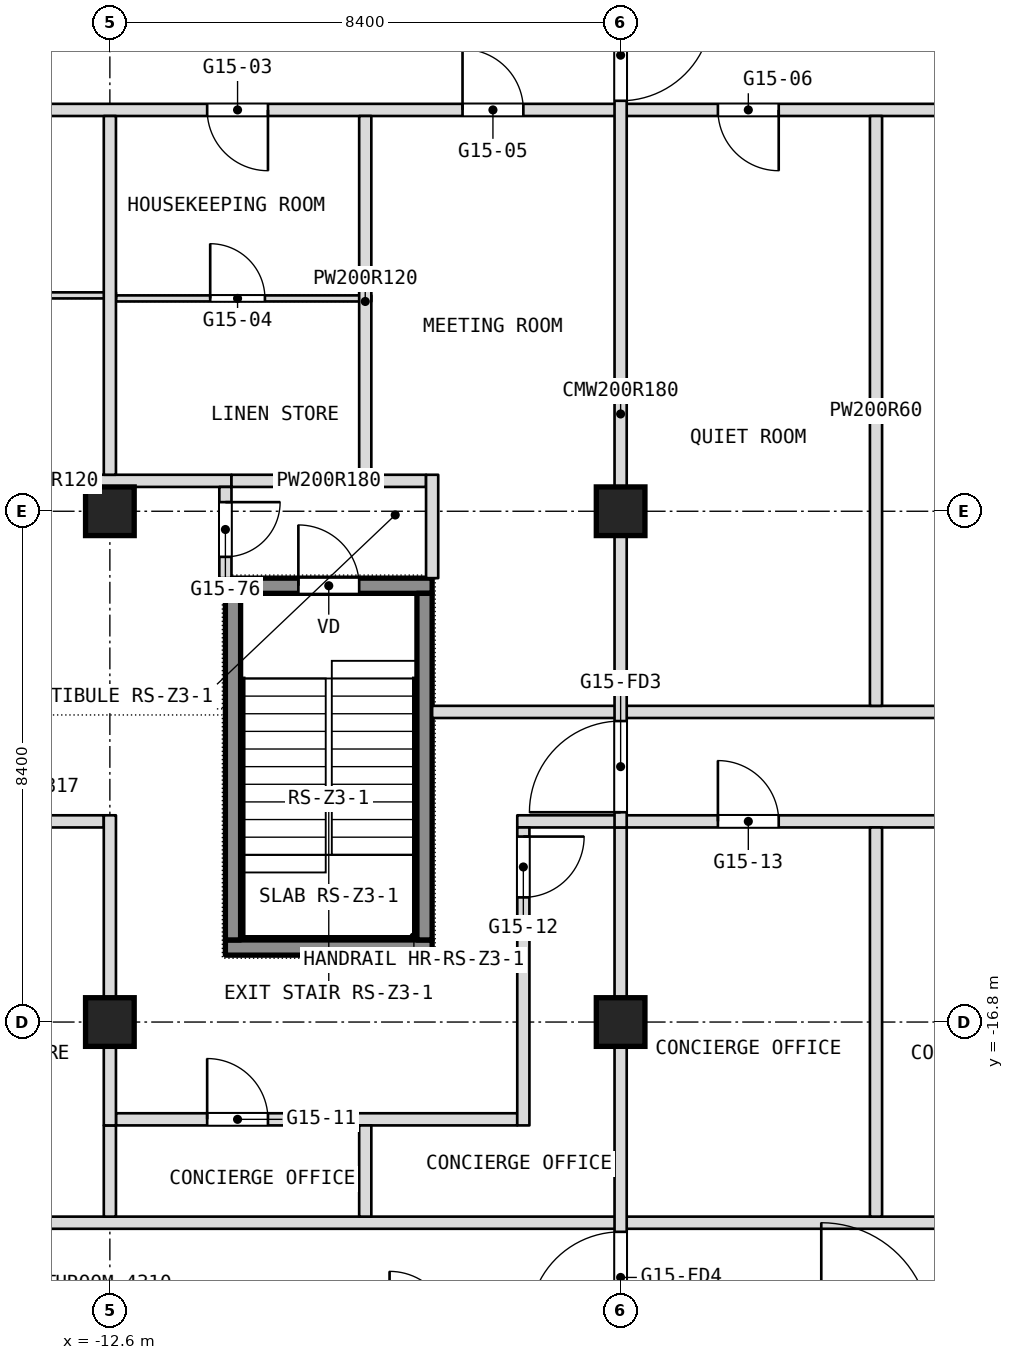
"""IFC4 building model, lengths in metres.
Left out: names, types, materials, properties, quantities, classifications, styles, units other than length and angle.
Written with IfcOpenShell. Run it as: python <this file> out.ifc"""

import sys

from ifc_helpers import new_model, si_unit, direction, frame, frame_2d, origin, origin_2d, place, context, subcontext, project, spatial, rectangle, extrude, element, fill, save


model = new_model("IFC4")
c1 = context("Model", 3, precision=1e-05, world=origin(), true_north=direction((0.0, 1.0)))
c2 = subcontext(c1, "Body", "Model", "MODEL_VIEW")
j1 = project(units=[si_unit("LENGTHUNIT", "METRE"), si_unit("PLANEANGLEUNIT", "RADIAN")], contexts=[c1])
p1 = place(None, origin())
s1 = spatial("IfcSite", under=j1, at=p1, CompositionType="ELEMENT")
p2 = place(p1, origin())
s2 = spatial("IfcBuilding", under=s1, at=p2, CompositionType="ELEMENT")
p3 = place(p2, frame((0.0, 0.0, 191.3)))
s3 = spatial("IfcBuildingStorey", under=s2, at=p3, CompositionType="ELEMENT", Elevation=191.3)
for number, where, z_axis, x_axis in (
    (1, (-12.6, -16.8, 0.0), (0.0, 0.0, 1.0), (1.0, 0.0, 0.0)),
    (2, (-12.6, -8.4, 0.0), (0.0, 0.0, 1.0), (1.0, 0.0, 0.0)),
    (3, (-4.2, -16.8, 0.0), (0.0, 0.0, 1.0), (1.0, 0.0, 0.0)),
    (4, (-4.2, -8.4, 0.0), (0.0, 0.0, 1.0), (1.0, 0.0, 0.0)),
):
    element("IfcColumn", number, at=place(p3, frame(where, z_axis=z_axis, x_axis=x_axis)), inside=s3, PredefinedType="COLUMN", context=c2, shape_type="SweptSolid", body=[
        extrude(rectangle(XDim=0.8, YDim=0.8, at=origin_2d()), origin(), (0.0, 0.0, 1.0), 3.6),
    ])
p4 = place(p3, frame((-16.7, -20.1, 0.0), z_axis=(0.0, 0.0, 1.0), x_axis=(1.0, 0.0, 0.0)))
e5 = element("IfcWall", 5, at=p4, inside=s3, PredefinedType="PARTITIONING", context=c2, shape_type="SweptSolid", body=[
    extrude(rectangle(XDim=33.4, YDim=0.2, at=frame_2d((16.7, 0.0))), origin(), (0.0, 0.0, 1.0), 3.34),
])
p5 = place(p3, frame((-12.5, -18.4, 0.0), z_axis=(0.0, 0.0, 1.0), x_axis=(1.0, 0.0, 0.0)))
e6 = element("IfcWall", 6, at=p5, inside=s3, PredefinedType="PARTITIONING", context=c2, shape_type="SweptSolid", body=[
    extrude(rectangle(XDim=6.6, YDim=0.2, at=frame_2d((3.3, 0.0))), origin(), (0.0, 0.0, 1.0), 3.34),
])
p6 = place(p5, frame((1.5, 0.0, 0.0)))
e7 = element("IfcOpeningElement", 7, at=p6, cuts=e6, PredefinedType="OPENING", context=c2, shape_type="SweptSolid", body=[
    extrude(rectangle(XDim=1.0, YDim=2.1, at=frame_2d((0.5, 1.05))), frame((0.0, 0.1, 0.0), z_axis=(0.0, -1.0, 0.0), x_axis=(1.0, 0.0, 0.0)), (0.0, 0.0, 1.0), 0.2),
])
p7 = place(p3, frame((-16.7, -13.5, 0.0), z_axis=(0.0, 0.0, 1.0), x_axis=(1.0, 0.0, 0.0)))
e8 = element("IfcWall", 8, at=p7, inside=s3, PredefinedType="PARTITIONING", context=c2, shape_type="SweptSolid", body=[
    extrude(rectangle(XDim=4.0, YDim=0.2, at=frame_2d((2.0, 0.0))), origin(), (0.0, 0.0, 1.0), 3.34),
])
p8 = place(p7, frame((1.5, 0.0, 0.0)))
e9 = element("IfcOpeningElement", 9, at=p8, cuts=e8, PredefinedType="OPENING", context=c2, shape_type="SweptSolid", body=[
    extrude(rectangle(XDim=1.0, YDim=2.1, at=frame_2d((0.5, 1.05))), frame((0.0, 0.1, 0.0), z_axis=(0.0, -1.0, 0.0), x_axis=(1.0, 0.0, 0.0)), (0.0, 0.0, 1.0), 0.2),
])
p9 = place(p3, frame((-5.9, -13.5, 0.0), z_axis=(0.0, 0.0, 1.0), x_axis=(1.0, 0.0, 0.0)))
e10 = element("IfcWall", 10, at=p9, inside=s3, PredefinedType="PARTITIONING", context=c2, shape_type="SweptSolid", body=[
    extrude(rectangle(XDim=11.6, YDim=0.2, at=frame_2d((5.8, 0.0))), origin(), (0.0, 0.0, 1.0), 3.34),
])
p10 = place(p9, frame((3.3, 0.0, 0.0)))
e11 = element("IfcOpeningElement", 11, at=p10, cuts=e10, PredefinedType="OPENING", context=c2, shape_type="SweptSolid", body=[
    extrude(rectangle(XDim=1.0, YDim=2.1, at=frame_2d((0.5, 1.05))), frame((0.0, 0.1, 0.0), z_axis=(0.0, -1.0, 0.0), x_axis=(1.0, 0.0, 0.0)), (0.0, 0.0, 1.0), 0.2),
])
p11 = place(p9, frame((7.5, 0.0, 0.0)))
e12 = element("IfcOpeningElement", 12, at=p11, cuts=e10, PredefinedType="OPENING", context=c2, shape_type="SweptSolid", body=[
    extrude(rectangle(XDim=1.0, YDim=2.1, at=frame_2d((0.5, 1.05))), frame((0.0, 0.1, 0.0), z_axis=(0.0, -1.0, 0.0), x_axis=(1.0, 0.0, 0.0)), (0.0, 0.0, 1.0), 0.2),
])
p12 = place(p9, frame((10.45, 0.0, 0.0)))
e13 = element("IfcOpeningElement", 13, at=p12, cuts=e10, PredefinedType="OPENING", context=c2, shape_type="SweptSolid", body=[
    extrude(rectangle(XDim=1.0, YDim=2.1, at=frame_2d((0.5, 1.05))), frame((0.0, 0.1, 0.0), z_axis=(0.0, -1.0, 0.0), x_axis=(1.0, 0.0, 0.0)), (0.0, 0.0, 1.0), 0.2),
])
p13 = place(p3, frame((-7.3, -11.7, 0.0), z_axis=(0.0, 0.0, 1.0), x_axis=(1.0, 0.0, 0.0)))
e14 = element("IfcWall", 14, at=p13, inside=s3, PredefinedType="PARTITIONING", context=c2, shape_type="SweptSolid", body=[
    extrude(rectangle(XDim=14.6, YDim=0.2, at=frame_2d((7.3, 0.0))), origin(), (0.0, 0.0, 1.0), 3.34),
])
p14 = place(p3, frame((-16.7, -7.9, 0.0), z_axis=(0.0, 0.0, 1.0), x_axis=(1.0, 0.0, 0.0)))
e15 = element("IfcWall", 15, at=p14, inside=s3, PredefinedType="PARTITIONING", context=c2, shape_type="SweptSolid", body=[
    extrude(rectangle(XDim=6.1, YDim=0.2, at=frame_2d((3.05, 0.0))), origin(), (0.0, 0.0, 1.0), 3.34),
])
p15 = place(p3, frame((-10.6, -7.9, 0.0), z_axis=(0.0, 0.0, 1.0), x_axis=(1.0, 0.0, 0.0)))
e16 = element("IfcWall", 16, at=p15, inside=s3, PredefinedType="PARTITIONING", context=c2, shape_type="SweptSolid", body=[
    extrude(rectangle(XDim=3.2, YDim=0.2, at=frame_2d((1.6, 0.0))), origin(), (0.0, 0.0, 1.0), 3.34),
])
p16 = place(p3, frame((-12.5, -4.9, 0.0), z_axis=(0.0, 0.0, 1.0), x_axis=(1.0, 0.0, 0.0)))
e17 = element("IfcWall", 17, at=p16, inside=s3, PredefinedType="PARTITIONING", context=c2, shape_type="SweptSolid", body=[
    extrude(rectangle(XDim=4.2, YDim=0.1, at=frame_2d((2.1, 0.0))), origin(), (0.0, 0.0, 1.0), 3.34),
])
p17 = place(p16, frame((1.55, 0.0, 0.0)))
e18 = element("IfcOpeningElement", 18, at=p17, cuts=e17, PredefinedType="OPENING", context=c2, shape_type="SweptSolid", body=[
    extrude(rectangle(XDim=0.9, YDim=2.1, at=frame_2d((0.45, 1.05))), frame((0.0, 0.05, 0.0), z_axis=(0.0, -1.0, 0.0), x_axis=(1.0, 0.0, 0.0)), (0.0, 0.0, 1.0), 0.1),
])
p18 = place(p3, frame((-16.7, -4.85, 0.0), z_axis=(0.0, 0.0, 1.0), x_axis=(1.0, 0.0, 0.0)))
e19 = element("IfcWall", 19, at=p18, inside=s3, PredefinedType="PARTITIONING", context=c2, shape_type="SweptSolid", body=[
    extrude(rectangle(XDim=4.2, YDim=0.1, at=frame_2d((2.1, 0.0))), origin(), (0.0, 0.0, 1.0), 3.34),
])
p19 = place(p18, frame((1.55, 0.0, 0.0)))
e20 = element("IfcOpeningElement", 20, at=p19, cuts=e19, PredefinedType="OPENING", context=c2, shape_type="SweptSolid", body=[
    extrude(rectangle(XDim=0.9, YDim=2.1, at=frame_2d((0.45, 1.05))), frame((0.0, 0.05, 0.0), z_axis=(0.0, -1.0, 0.0), x_axis=(1.0, 0.0, 0.0)), (0.0, 0.0, 1.0), 0.1),
])
p20 = place(p3, frame((-16.9, -1.8, 0.0), z_axis=(0.0, 0.0, 1.0), x_axis=(1.0, 0.0, 0.0)))
e21 = element("IfcWall", 21, at=p20, inside=s3, PredefinedType="PARTITIONING", context=c2, shape_type="SweptSolid", body=[
    extrude(rectangle(XDim=33.8, YDim=0.2, at=frame_2d((16.9, 0.0))), origin(), (0.0, 0.0, 1.0), 3.34),
])
p21 = place(p20, frame((1.7, 0.0, 0.0)))
e22 = element("IfcOpeningElement", 22, at=p21, cuts=e21, PredefinedType="OPENING", context=c2, shape_type="SweptSolid", body=[
    extrude(rectangle(XDim=1.0, YDim=2.1, at=frame_2d((0.5, 1.05))), frame((0.0, 0.1, 0.0), z_axis=(0.0, -1.0, 0.0), x_axis=(1.0, 0.0, 0.0)), (0.0, 0.0, 1.0), 0.2),
])
p22 = place(p20, frame((5.9, 0.0, 0.0)))
e23 = element("IfcOpeningElement", 23, at=p22, cuts=e21, PredefinedType="OPENING", context=c2, shape_type="SweptSolid", body=[
    extrude(rectangle(XDim=1.0, YDim=2.1, at=frame_2d((0.5, 1.05))), frame((0.0, 0.1, 0.0), z_axis=(0.0, -1.0, 0.0), x_axis=(1.0, 0.0, 0.0)), (0.0, 0.0, 1.0), 0.2),
])
p23 = place(p20, frame((10.1, 0.0, 0.0)))
e24 = element("IfcOpeningElement", 24, at=p23, cuts=e21, PredefinedType="OPENING", context=c2, shape_type="SweptSolid", body=[
    extrude(rectangle(XDim=1.0, YDim=2.1, at=frame_2d((0.5, 1.05))), frame((0.0, 0.1, 0.0), z_axis=(0.0, -1.0, 0.0), x_axis=(1.0, 0.0, 0.0)), (0.0, 0.0, 1.0), 0.2),
])
p24 = place(p20, frame((14.3, 0.0, 0.0)))
e25 = element("IfcOpeningElement", 25, at=p24, cuts=e21, PredefinedType="OPENING", context=c2, shape_type="SweptSolid", body=[
    extrude(rectangle(XDim=1.0, YDim=2.1, at=frame_2d((0.5, 1.05))), frame((0.0, 0.1, 0.0), z_axis=(0.0, -1.0, 0.0), x_axis=(1.0, 0.0, 0.0)), (0.0, 0.0, 1.0), 0.2),
])
p25 = place(p20, frame((18.5, 0.0, 0.0)))
e26 = element("IfcOpeningElement", 26, at=p25, cuts=e21, PredefinedType="OPENING", context=c2, shape_type="SweptSolid", body=[
    extrude(rectangle(XDim=1.0, YDim=2.1, at=frame_2d((0.5, 1.05))), frame((0.0, 0.1, 0.0), z_axis=(0.0, -1.0, 0.0), x_axis=(1.0, 0.0, 0.0)), (0.0, 0.0, 1.0), 0.2),
])
p26 = place(p20, frame((24.4, 0.0, 0.0)))
e27 = element("IfcOpeningElement", 27, at=p26, cuts=e21, PredefinedType="OPENING", context=c2, shape_type="SweptSolid", body=[
    extrude(rectangle(XDim=1.8, YDim=2.1, at=frame_2d((0.9, 1.05))), frame((0.0, 0.1, 0.0), z_axis=(0.0, -1.0, 0.0), x_axis=(1.0, 0.0, 0.0)), (0.0, 0.0, 1.0), 0.2),
])
p27 = place(p20, frame((31.1, 0.0, 0.0)))
e28 = element("IfcOpeningElement", 28, at=p27, cuts=e21, PredefinedType="OPENING", context=c2, shape_type="SweptSolid", body=[
    extrude(rectangle(XDim=1.0, YDim=2.1, at=frame_2d((0.5, 1.05))), frame((0.0, 0.1, 0.0), z_axis=(0.0, -1.0, 0.0), x_axis=(1.0, 0.0, 0.0)), (0.0, 0.0, 1.0), 0.2),
])
p28 = place(p3, frame((0.0, -20.0, 0.0), z_axis=(0.0, 0.0, 1.0), x_axis=(0.0, 1.0, 0.0)))
e29 = element("IfcWall", 29, at=p28, inside=s3, PredefinedType="PARTITIONING", context=c2, shape_type="SweptSolid", body=[
    extrude(rectangle(XDim=6.4, YDim=0.2, at=frame_2d((3.2, 0.0))), origin(), (0.0, 0.0, 1.0), 3.34),
])
p29 = place(p3, frame((0.0, -11.6, 0.0), z_axis=(0.0, 0.0, 1.0), x_axis=(0.0, 1.0, 0.0)))
e30 = element("IfcWall", 30, at=p29, inside=s3, PredefinedType="PARTITIONING", context=c2, shape_type="SweptSolid", body=[
    extrude(rectangle(XDim=9.7, YDim=0.2, at=frame_2d((4.85, 0.0))), origin(), (0.0, 0.0, 1.0), 3.34),
])
p30 = place(p3, frame((-4.2, -22.0, 0.0), z_axis=(0.0, 0.0, 1.0), x_axis=(0.0, 1.0, 0.0)))
e31 = element("IfcWall", 31, at=p30, inside=s3, PredefinedType="PARTITIONING", context=c2, shape_type="SweptSolid", body=[
    extrude(rectangle(XDim=8.4, YDim=0.2, at=frame_2d((4.2, 0.0))), origin(), (0.0, 0.0, 1.0), 3.34),
])
p31 = place(p30, frame((0.25, 0.0, 0.0)))
e32 = element("IfcOpeningElement", 32, at=p31, cuts=e31, PredefinedType="OPENING", context=c2, shape_type="SweptSolid", body=[
    extrude(rectangle(XDim=1.5, YDim=2.1, at=frame_2d((0.75, 1.05))), frame((0.0, 0.1, 0.0), z_axis=(0.0, -1.0, 0.0), x_axis=(1.0, 0.0, 0.0)), (0.0, 0.0, 1.0), 0.2),
])
p32 = place(p3, frame((-4.2, -13.6, 0.0), z_axis=(0.0, 0.0, 1.0), x_axis=(0.0, 1.0, 0.0)))
e33 = element("IfcWall", 33, at=p32, inside=s3, PredefinedType="PARTITIONING", context=c2, shape_type="SweptSolid", body=[
    extrude(rectangle(XDim=13.6, YDim=0.2, at=frame_2d((6.8, 0.0))), origin(), (0.0, 0.0, 1.0), 3.34),
])
p33 = place(p32, frame((11.95, 0.0, 0.0)))
e34 = element("IfcOpeningElement", 34, at=p33, cuts=e33, PredefinedType="OPENING", context=c2, shape_type="SweptSolid", body=[
    extrude(rectangle(XDim=1.5, YDim=2.1, at=frame_2d((0.75, 1.05))), frame((0.0, 0.1, 0.0), z_axis=(0.0, -1.0, 0.0), x_axis=(1.0, 0.0, 0.0)), (0.0, 0.0, 1.0), 0.2),
])
p34 = place(p32, frame((0.25, 0.0, 0.0)))
e35 = element("IfcOpeningElement", 35, at=p34, cuts=e33, PredefinedType="OPENING", context=c2, shape_type="SweptSolid", body=[
    extrude(rectangle(XDim=1.5, YDim=2.1, at=frame_2d((0.75, 1.05))), frame((0.0, 0.1, 0.0), z_axis=(0.0, -1.0, 0.0), x_axis=(1.0, 0.0, 0.0)), (0.0, 0.0, 1.0), 0.2),
])
p35 = place(p3, frame((-5.8, -18.5, 0.0), z_axis=(0.0, 0.0, 1.0), x_axis=(0.0, 1.0, 0.0)))
e36 = element("IfcWall", 36, at=p35, inside=s3, PredefinedType="PARTITIONING", context=c2, shape_type="SweptSolid", body=[
    extrude(rectangle(XDim=4.9, YDim=0.2, at=frame_2d((2.45, 0.0))), origin(), (0.0, 0.0, 1.0), 3.34),
])
p36 = place(p35, frame((3.75, 0.0, 0.0)))
e37 = element("IfcOpeningElement", 37, at=p36, cuts=e36, PredefinedType="OPENING", context=c2, shape_type="SweptSolid", body=[
    extrude(rectangle(XDim=1.0, YDim=2.1, at=frame_2d((0.5, 1.05))), frame((0.0, 0.1, 0.0), z_axis=(0.0, -1.0, 0.0), x_axis=(1.0, 0.0, 0.0)), (0.0, 0.0, 1.0), 0.2),
])
p37 = place(p3, frame((-7.3, -9.5, 0.0), z_axis=(0.0, 0.0, 1.0), x_axis=(0.0, 1.0, 0.0)))
e38 = element("IfcWall", 38, at=p37, inside=s3, PredefinedType="PARTITIONING", context=c2, shape_type="SweptSolid", body=[
    extrude(rectangle(XDim=1.7, YDim=0.2, at=frame_2d((0.85, 0.0))), origin(), (0.0, 0.0, 1.0), 3.34),
])
p38 = place(p3, frame((-8.4, -20.0, 0.0), z_axis=(0.0, 0.0, 1.0), x_axis=(0.0, 1.0, 0.0)))
e39 = element("IfcWall", 39, at=p38, inside=s3, PredefinedType="PARTITIONING", context=c2, shape_type="SweptSolid", body=[
    extrude(rectangle(XDim=1.5, YDim=0.2, at=frame_2d((0.75, 0.0))), origin(), (0.0, 0.0, 1.0), 3.34),
])
p39 = place(p3, frame((-8.4, -8.0, 0.0), z_axis=(0.0, 0.0, 1.0), x_axis=(0.0, 1.0, 0.0)))
e40 = element("IfcWall", 40, at=p39, inside=s3, PredefinedType="PARTITIONING", context=c2, shape_type="SweptSolid", body=[
    extrude(rectangle(XDim=6.1, YDim=0.2, at=frame_2d((3.05, 0.0))), origin(), (0.0, 0.0, 1.0), 3.34),
])
p40 = place(p3, frame((-10.7, -9.5, 0.0), z_axis=(0.0, 0.0, 1.0), x_axis=(0.0, 1.0, 0.0)))
e41 = element("IfcWall", 41, at=p40, inside=s3, PredefinedType="PARTITIONING", context=c2, shape_type="SweptSolid", body=[
    extrude(rectangle(XDim=1.5, YDim=0.2, at=frame_2d((0.75, 0.0))), origin(), (0.0, 0.0, 1.0), 3.34),
])
p41 = place(p40, frame((0.35, 0.0, 0.0)))
e42 = element("IfcOpeningElement", 42, at=p41, cuts=e41, PredefinedType="OPENING", context=c2, shape_type="SweptSolid", body=[
    extrude(rectangle(XDim=0.9, YDim=2.1, at=frame_2d((0.45, 1.05))), frame((0.0, 0.1, 0.0), z_axis=(0.0, -1.0, 0.0), x_axis=(1.0, 0.0, 0.0)), (0.0, 0.0, 1.0), 0.2),
])
p42 = place(p3, frame((-12.6, -20.0, 0.0), z_axis=(0.0, 0.0, 1.0), x_axis=(0.0, 1.0, 0.0)))
e43 = element("IfcWall", 43, at=p42, inside=s3, PredefinedType="PARTITIONING", context=c2, shape_type="SweptSolid", body=[
    extrude(rectangle(XDim=1.5, YDim=0.2, at=frame_2d((0.75, 0.0))), origin(), (0.0, 0.0, 1.0), 3.34),
])
p43 = place(p3, frame((-12.6, -7.8, 0.0), z_axis=(0.0, 0.0, 1.0), x_axis=(0.0, 1.0, 0.0)))
e44 = element("IfcWall", 44, at=p43, inside=s3, PredefinedType="PARTITIONING", context=c2, shape_type="SweptSolid", body=[
    extrude(rectangle(XDim=5.9, YDim=0.2, at=frame_2d((2.95, 0.0))), origin(), (0.0, 0.0, 1.0), 3.34),
])
p44 = place(p3, frame((-12.6, -18.5, 0.0), z_axis=(0.0, 0.0, 1.0), x_axis=(0.0, 1.0, 0.0)))
e45 = element("IfcWall", 45, at=p44, inside=s3, PredefinedType="PARTITIONING", context=c2, shape_type="SweptSolid", body=[
    extrude(rectangle(XDim=5.1, YDim=0.2, at=frame_2d((2.55, 0.0))), origin(), (0.0, 0.0, 1.0), 3.34),
])
p45 = place(p3, frame((-10.7, -15.575, 0.1), z_axis=(0.0, 0.0, 1.0), x_axis=(1.0, 0.0, 0.0)))
e46 = element("IfcWall", 46, at=p45, inside=s3, PredefinedType="SHEAR", context=c2, shape_type="SweptSolid", body=[
    extrude(rectangle(XDim=3.4, YDim=0.25, at=frame_2d((1.7, 0.0))), origin(), (0.0, 0.0, 1.0), 3.6),
])
p46 = place(p3, frame((-10.7, -9.625, 0.1), z_axis=(0.0, 0.0, 1.0), x_axis=(1.0, 0.0, 0.0)))
e47 = element("IfcWall", 47, at=p46, inside=s3, PredefinedType="SHEAR", context=c2, shape_type="SweptSolid", body=[
    extrude(rectangle(XDim=3.4, YDim=0.25, at=frame_2d((1.7, 0.0))), origin(), (0.0, 0.0, 1.0), 3.6),
])
p47 = place(p46, frame((1.2, 0.0, 0.0)))
e48 = element("IfcOpeningElement", 48, at=p47, cuts=e47, PredefinedType="OPENING", context=c2, shape_type="SweptSolid", body=[
    extrude(rectangle(XDim=1.0, YDim=2.1, at=frame_2d((0.5, 1.05))), frame((0.0, 0.125, 0.0), z_axis=(0.0, -1.0, 0.0), x_axis=(1.0, 0.0, 0.0)), (0.0, 0.0, 1.0), 0.25),
])
for number, where, z_axis, x_axis in (
    (49, (-10.575, -15.45, 0.1), (0.0, 0.0, 1.0), (0.0, 1.0, 0.0)),
    (50, (-7.425, -15.45, 0.1), (0.0, 0.0, 1.0), (0.0, 1.0, 0.0)),
):
    element("IfcWall", number, at=place(p3, frame(where, z_axis=z_axis, x_axis=x_axis)), inside=s3, PredefinedType="SHEAR", context=c2, shape_type="SweptSolid", body=[
        extrude(rectangle(XDim=5.7, YDim=0.25, at=frame_2d((2.85, 0.0))), origin(), (0.0, 0.0, 1.0), 3.6),
    ])
p48 = place(p6, origin())
e51 = element("IfcDoor", 51, at=p48, inside=s3, OperationType="SINGLE_SWING_RIGHT", PredefinedType="DOOR", context=c2, shape_type="SweptSolid", body=[
    extrude(rectangle(XDim=1.0, YDim=2.1, at=frame_2d((0.5, 1.05))), frame((0.0, 0.025, 0.0), z_axis=(0.0, -1.0, 0.0), x_axis=(1.0, 0.0, 0.0)), (0.0, 0.0, 1.0), 0.05),
])
fill(e7, e51)
p49 = place(p10, origin())
e52 = element("IfcDoor", 52, at=p49, inside=s3, OperationType="SINGLE_SWING_LEFT", PredefinedType="DOOR", context=c2, shape_type="SweptSolid", body=[
    extrude(rectangle(XDim=1.0, YDim=2.1, at=frame_2d((0.5, 1.05))), frame((0.0, 0.025, 0.0), z_axis=(0.0, -1.0, 0.0), x_axis=(1.0, 0.0, 0.0)), (0.0, 0.0, 1.0), 0.05),
])
fill(e11, e52)
p50 = place(p17, origin())
e53 = element("IfcDoor", 53, at=p50, inside=s3, OperationType="SINGLE_SWING_RIGHT", PredefinedType="DOOR", context=c2, shape_type="SweptSolid", body=[
    extrude(rectangle(XDim=0.9, YDim=2.1, at=frame_2d((0.45, 1.05))), frame((0.0, 0.025, 0.0), z_axis=(0.0, -1.0, 0.0), x_axis=(1.0, 0.0, 0.0)), (0.0, 0.0, 1.0), 0.05),
])
fill(e18, e53)
p51 = place(p22, origin())
e54 = element("IfcDoor", 54, at=p51, inside=s3, OperationType="SINGLE_SWING_LEFT", PredefinedType="DOOR", context=c2, shape_type="SweptSolid", body=[
    extrude(rectangle(XDim=1.0, YDim=2.1, at=frame_2d((0.5, 1.05))), frame((0.0, 0.025, 0.0), z_axis=(0.0, -1.0, 0.0), x_axis=(1.0, 0.0, 0.0)), (0.0, 0.0, 1.0), 0.05),
])
fill(e23, e54)
p52 = place(p23, origin())
e55 = element("IfcDoor", 55, at=p52, inside=s3, OperationType="SINGLE_SWING_RIGHT", PredefinedType="DOOR", context=c2, shape_type="SweptSolid", body=[
    extrude(rectangle(XDim=1.0, YDim=2.1, at=frame_2d((0.5, 1.05))), frame((0.0, 0.025, 0.0), z_axis=(0.0, -1.0, 0.0), x_axis=(1.0, 0.0, 0.0)), (0.0, 0.0, 1.0), 0.05),
])
fill(e24, e55)
p53 = place(p24, origin())
e56 = element("IfcDoor", 56, at=p53, inside=s3, OperationType="SINGLE_SWING_LEFT", PredefinedType="DOOR", context=c2, shape_type="SweptSolid", body=[
    extrude(rectangle(XDim=1.0, YDim=2.1, at=frame_2d((0.5, 1.05))), frame((0.0, 0.025, 0.0), z_axis=(0.0, -1.0, 0.0), x_axis=(1.0, 0.0, 0.0)), (0.0, 0.0, 1.0), 0.05),
])
fill(e25, e56)
p54 = place(p36, origin())
e57 = element("IfcDoor", 57, at=p54, inside=s3, OperationType="SINGLE_SWING_RIGHT", PredefinedType="DOOR", context=c2, shape_type="SweptSolid", body=[
    extrude(rectangle(XDim=1.0, YDim=2.1, at=frame_2d((0.5, 1.05))), frame((0.0, 0.025, 0.0), z_axis=(0.0, -1.0, 0.0), x_axis=(1.0, 0.0, 0.0)), (0.0, 0.0, 1.0), 0.05),
])
fill(e37, e57)
p55 = place(p41, origin())
e58 = element("IfcDoor", 58, at=p55, inside=s3, OperationType="SINGLE_SWING_LEFT", PredefinedType="DOOR", context=c2, shape_type="SweptSolid", body=[
    extrude(rectangle(XDim=0.9, YDim=2.1, at=frame_2d((0.45, 1.05))), frame((0.0, 0.025, 0.0), z_axis=(0.0, -1.0, 0.0), x_axis=(1.0, 0.0, 0.0)), (0.0, 0.0, 1.0), 0.05),
])
fill(e42, e58)
p56 = place(p47, origin())
e59 = element("IfcDoor", 59, at=p56, inside=s3, OperationType="SINGLE_SWING_LEFT", PredefinedType="DOOR", context=c2, shape_type="SweptSolid", body=[
    extrude(rectangle(XDim=1.0, YDim=2.1, at=frame_2d((0.5, 1.05))), frame((0.0, 0.025, 0.0), z_axis=(0.0, -1.0, 0.0), x_axis=(1.0, 0.0, 0.0)), (0.0, 0.0, 1.0), 0.05),
])
fill(e48, e59)
p57 = place(p33, origin())
e60 = element("IfcDoor", 60, at=p57, inside=s3, OperationType="DOUBLE_DOOR_DOUBLE_SWING", PredefinedType="DOOR", context=c2, shape_type="SweptSolid", body=[
    extrude(rectangle(XDim=1.5, YDim=2.1, at=frame_2d((0.75, 1.05))), frame((0.0, 0.025, 0.0), z_axis=(0.0, -1.0, 0.0), x_axis=(1.0, 0.0, 0.0)), (0.0, 0.0, 1.0), 0.05),
])
fill(e34, e60)
p58 = place(p34, origin())
e61 = element("IfcDoor", 61, at=p58, inside=s3, OperationType="DOUBLE_DOOR_DOUBLE_SWING", PredefinedType="DOOR", context=c2, shape_type="SweptSolid", body=[
    extrude(rectangle(XDim=1.5, YDim=2.1, at=frame_2d((0.75, 1.05))), frame((0.0, 0.025, 0.0), z_axis=(0.0, -1.0, 0.0), x_axis=(1.0, 0.0, 0.0)), (0.0, 0.0, 1.0), 0.05),
])
fill(e35, e61)
p59 = place(p31, origin())
e62 = element("IfcDoor", 62, at=p59, inside=s3, OperationType="DOUBLE_DOOR_DOUBLE_SWING", PredefinedType="DOOR", context=c2, shape_type="SweptSolid", body=[
    extrude(rectangle(XDim=1.5, YDim=2.1, at=frame_2d((0.75, 1.05))), frame((0.0, 0.025, 0.0), z_axis=(0.0, -1.0, 0.0), x_axis=(1.0, 0.0, 0.0)), (0.0, 0.0, 1.0), 0.05),
])
fill(e32, e62)
save(model, sys.argv[1])
